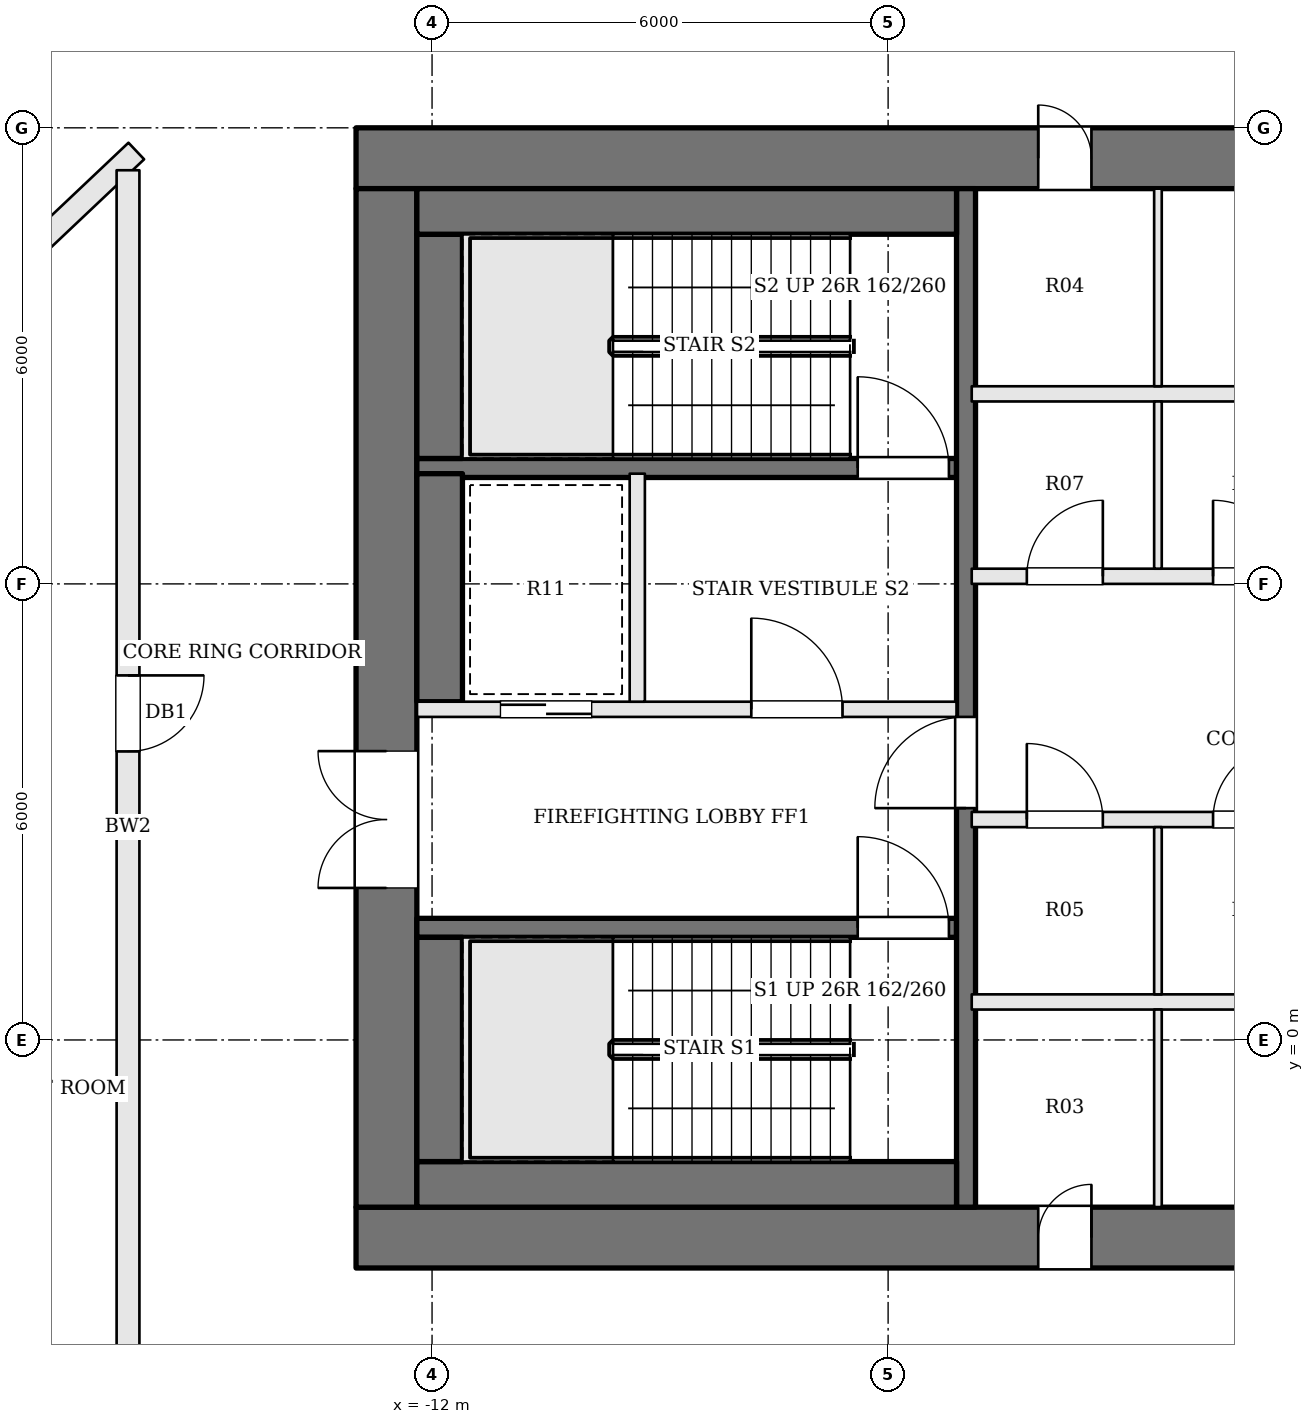
"""IFC4 building model, lengths in metres.
Left out: names, types, materials, properties, quantities, classifications, styles, units other than length and angle.
Written with IfcOpenShell. Run it as: python <this file> out.ifc"""

import sys

from ifc_helpers import new_model, si_unit, direction, frame, frame_2d, origin, place, context, subcontext, project, spatial, rectangle, extrude, element, fill, save


model = new_model("IFC4")
c1 = context("Model", 3, precision=1e-05, world=origin(), true_north=direction((0.0, 1.0)))
c2 = subcontext(c1, "Body", "Model", "MODEL_VIEW")
j1 = project(units=[si_unit("LENGTHUNIT", "METRE"), si_unit("PLANEANGLEUNIT", "RADIAN")], contexts=[c1])
p1 = place(None, origin())
s1 = spatial("IfcSite", under=j1, at=p1, CompositionType="ELEMENT")
p2 = place(p1, origin())
s2 = spatial("IfcBuilding", under=s1, at=p2, CompositionType="ELEMENT")
p3 = place(p2, frame((0.0, 0.0, 312.0)))
s3 = spatial("IfcBuildingStorey", under=s2, at=p3, CompositionType="ELEMENT", Elevation=312.0)
p4 = place(p3, frame((-13.0, 11.6, 0.0), z_axis=(0.0, 0.0, 1.0), x_axis=(1.0, 0.0, 0.0)))
e1 = element("IfcWall", 1, at=p4, inside=s3, PredefinedType="SHEAR", context=c2, shape_type="SweptSolid", body=[
    extrude(rectangle(XDim=26.0, YDim=0.8, at=frame_2d((13.0, 0.0))), origin(), (0.0, 0.0, 1.0), 4.2),
])
p5 = place(p4, frame((8.975, 0.0, 0.0)))
e2 = element("IfcOpeningElement", 2, at=p5, cuts=e1, PredefinedType="OPENING", context=c2, shape_type="SweptSolid", body=[
    extrude(rectangle(XDim=0.7, YDim=2.1, at=frame_2d((0.35, 1.05))), frame((0.0, 0.41, 0.0), z_axis=(0.0, -1.0, 0.0), x_axis=(1.0, 0.0, 0.0)), (0.0, 0.0, 1.0), 0.82),
])
p6 = place(p4, frame((11.575, 0.0, 0.0)))
e3 = element("IfcOpeningElement", 3, at=p6, cuts=e1, PredefinedType="OPENING", context=c2, shape_type="SweptSolid", body=[
    extrude(rectangle(XDim=1.2, YDim=2.1, at=frame_2d((0.6, 1.05))), frame((0.0, 0.41, 0.0), z_axis=(0.0, -1.0, 0.0), x_axis=(1.0, 0.0, 0.0)), (0.0, 0.0, 1.0), 0.82),
])
p7 = place(p4, frame((14.675, 0.0, 0.0)))
e4 = element("IfcOpeningElement", 4, at=p7, cuts=e1, PredefinedType="OPENING", context=c2, shape_type="SweptSolid", body=[
    extrude(rectangle(XDim=0.7, YDim=2.1, at=frame_2d((0.35, 1.05))), frame((0.0, 0.41, 0.0), z_axis=(0.0, -1.0, 0.0), x_axis=(1.0, 0.0, 0.0)), (0.0, 0.0, 1.0), 0.82),
])
p8 = place(p4, frame((16.725, 0.0, 0.0)))
e5 = element("IfcOpeningElement", 5, at=p8, cuts=e1, PredefinedType="OPENING", context=c2, shape_type="SweptSolid", body=[
    extrude(rectangle(XDim=0.7, YDim=2.1, at=frame_2d((0.35, 1.05))), frame((0.0, 0.41, 0.0), z_axis=(0.0, -1.0, 0.0), x_axis=(1.0, 0.0, 0.0)), (0.0, 0.0, 1.0), 0.82),
])
p9 = place(p3, frame((-13.0, -2.6, 0.0), z_axis=(0.0, 0.0, 1.0), x_axis=(1.0, 0.0, 0.0)))
e6 = element("IfcWall", 6, at=p9, inside=s3, PredefinedType="SHEAR", context=c2, shape_type="SweptSolid", body=[
    extrude(rectangle(XDim=26.0, YDim=0.8, at=frame_2d((13.0, 0.0))), origin(), (0.0, 0.0, 1.0), 4.2),
])
p10 = place(p9, frame((8.975, 0.0, 0.0)))
e7 = element("IfcOpeningElement", 7, at=p10, cuts=e6, PredefinedType="OPENING", context=c2, shape_type="SweptSolid", body=[
    extrude(rectangle(XDim=0.7, YDim=2.1, at=frame_2d((0.35, 1.05))), frame((0.0, 0.41, 0.0), z_axis=(0.0, -1.0, 0.0), x_axis=(1.0, 0.0, 0.0)), (0.0, 0.0, 1.0), 0.82),
])
p11 = place(p9, frame((12.0, 0.0, 0.0)))
e8 = element("IfcOpeningElement", 8, at=p11, cuts=e6, PredefinedType="OPENING", context=c2, shape_type="SweptSolid", body=[
    extrude(rectangle(XDim=1.2, YDim=2.1, at=frame_2d((0.6, 1.05))), frame((0.0, 0.41, 0.0), z_axis=(0.0, -1.0, 0.0), x_axis=(1.0, 0.0, 0.0)), (0.0, 0.0, 1.0), 0.82),
])
p12 = place(p9, frame((15.675, 0.0, 0.0)))
e9 = element("IfcOpeningElement", 9, at=p12, cuts=e6, PredefinedType="OPENING", context=c2, shape_type="SweptSolid", body=[
    extrude(rectangle(XDim=1.2, YDim=2.1, at=frame_2d((0.6, 1.05))), frame((0.0, 0.41, 0.0), z_axis=(0.0, -1.0, 0.0), x_axis=(1.0, 0.0, 0.0)), (0.0, 0.0, 1.0), 0.82),
])
p13 = place(p3, frame((-12.6, -2.2, 0.0), z_axis=(0.0, 0.0, 1.0), x_axis=(0.0, 1.0, 0.0)))
e10 = element("IfcWall", 10, at=p13, inside=s3, PredefinedType="SHEAR", context=c2, shape_type="SweptSolid", body=[
    extrude(rectangle(XDim=13.4, YDim=0.8, at=frame_2d((6.7, 0.0))), origin(), (0.0, 0.0, 1.0), 4.2),
])
p14 = place(p13, frame((4.2, 0.0, 0.0)))
e11 = element("IfcOpeningElement", 11, at=p14, cuts=e10, PredefinedType="OPENING", context=c2, shape_type="SweptSolid", body=[
    extrude(rectangle(XDim=1.8, YDim=2.1, at=frame_2d((0.9, 1.05))), frame((0.0, 0.41, 0.0), z_axis=(0.0, -1.0, 0.0), x_axis=(1.0, 0.0, 0.0)), (0.0, 0.0, 1.0), 0.82),
])
p15 = place(p3, frame((-12.2, 1.475, 0.0), z_axis=(0.0, 0.0, 1.0), x_axis=(1.0, 0.0, 0.0)))
e12 = element("IfcWall", 12, at=p15, inside=s3, PredefinedType="SOLIDWALL", context=c2, shape_type="SweptSolid", body=[
    extrude(rectangle(XDim=7.1, YDim=0.25, at=frame_2d((3.55, 0.0))), origin(), (0.0, 0.0, 1.0), 4.0),
])
p16 = place(p15, frame((5.8, 0.0, 0.0)))
e13 = element("IfcOpeningElement", 13, at=p16, cuts=e12, PredefinedType="OPENING", context=c2, shape_type="SweptSolid", body=[
    extrude(rectangle(XDim=1.2, YDim=2.1, at=frame_2d((0.6, 1.05))), frame((0.0, 0.135, 0.0), z_axis=(0.0, -1.0, 0.0), x_axis=(1.0, 0.0, 0.0)), (0.0, 0.0, 1.0), 0.27),
])
p17 = place(p3, frame((-12.2, 4.35, 0.0), z_axis=(0.0, 0.0, 1.0), x_axis=(1.0, 0.0, 0.0)))
e14 = element("IfcWall", 14, at=p17, inside=s3, PredefinedType="SOLIDWALL", context=c2, shape_type="SweptSolid", body=[
    extrude(rectangle(XDim=7.1, YDim=0.2, at=frame_2d((3.55, 0.0))), origin(), (0.0, 0.0, 1.0), 4.0),
])
p18 = place(p17, frame((4.4, 0.0, 0.0)))
e15 = element("IfcOpeningElement", 15, at=p18, cuts=e14, PredefinedType="OPENING", context=c2, shape_type="SweptSolid", body=[
    extrude(rectangle(XDim=1.2, YDim=2.1, at=frame_2d((0.6, 1.05))), frame((0.0, 0.11, 0.0), z_axis=(0.0, -1.0, 0.0), x_axis=(1.0, 0.0, 0.0)), (0.0, 0.0, 1.0), 0.22),
])
p19 = place(p17, frame((1.1, 0.0, 0.0)))
e16 = element("IfcOpeningElement", 16, at=p19, cuts=e14, PredefinedType="OPENING", context=c2, shape_type="SweptSolid", body=[
    extrude(rectangle(XDim=1.2, YDim=2.1, at=frame_2d((0.6, 1.05))), frame((0.0, 0.11, 0.0), z_axis=(0.0, -1.0, 0.0), x_axis=(1.0, 0.0, 0.0)), (0.0, 0.0, 1.0), 0.22),
])
p20 = place(p3, frame((-12.2, 7.525, 0.0), z_axis=(0.0, 0.0, 1.0), x_axis=(1.0, 0.0, 0.0)))
e17 = element("IfcWall", 17, at=p20, inside=s3, PredefinedType="SOLIDWALL", context=c2, shape_type="SweptSolid", body=[
    extrude(rectangle(XDim=7.1, YDim=0.25, at=frame_2d((3.55, 0.0))), origin(), (0.0, 0.0, 1.0), 4.0),
])
p21 = place(p20, frame((5.8, 0.0, 0.0)))
e18 = element("IfcOpeningElement", 18, at=p21, cuts=e17, PredefinedType="OPENING", context=c2, shape_type="SweptSolid", body=[
    extrude(rectangle(XDim=1.2, YDim=2.1, at=frame_2d((0.6, 1.05))), frame((0.0, 0.135, 0.0), z_axis=(0.0, -1.0, 0.0), x_axis=(1.0, 0.0, 0.0)), (0.0, 0.0, 1.0), 0.27),
])
p22 = place(p3, frame((-9.3, 4.45, 0.0), z_axis=(0.0, 0.0, 1.0), x_axis=(0.0, 1.0, 0.0)))
e19 = element("IfcWall", 19, at=p22, inside=s3, PredefinedType="SOLIDWALL", context=c2, shape_type="SweptSolid", body=[
    extrude(rectangle(XDim=3.0, YDim=0.2, at=frame_2d((1.5, 0.0))), origin(), (0.0, 0.0, 1.0), 4.0),
])
p23 = place(p3, frame((-4.975, -2.2, 0.0), z_axis=(0.0, 0.0, 1.0), x_axis=(0.0, 1.0, 0.0)))
e20 = element("IfcWall", 20, at=p23, inside=s3, PredefinedType="SOLIDWALL", context=c2, shape_type="SweptSolid", body=[
    extrude(rectangle(XDim=13.4, YDim=0.25, at=frame_2d((6.7, 0.0))), origin(), (0.0, 0.0, 1.0), 4.0),
])
p24 = place(p23, frame((5.25, 0.0, 0.0)))
e21 = element("IfcOpeningElement", 21, at=p24, cuts=e20, PredefinedType="OPENING", context=c2, shape_type="SweptSolid", body=[
    extrude(rectangle(XDim=1.2, YDim=2.1, at=frame_2d((0.6, 1.05))), frame((0.0, 0.135, 0.0), z_axis=(0.0, -1.0, 0.0), x_axis=(1.0, 0.0, 0.0)), (0.0, 0.0, 1.0), 0.27),
])
p25 = place(p3, frame((-12.2, -1.9, 0.0), z_axis=(0.0, 0.0, 1.0), x_axis=(1.0, 0.0, 0.0)))
e22 = element("IfcWall", 22, at=p25, inside=s3, PredefinedType="SOLIDWALL", context=c2, shape_type="SweptSolid", body=[
    extrude(rectangle(XDim=7.1, YDim=0.6, at=frame_2d((3.55, 0.0))), origin(), (0.0, 0.0, 1.0), 4.0),
])
p26 = place(p3, frame((-11.9, -1.6, 0.0), z_axis=(0.0, 0.0, 1.0), x_axis=(0.0, 1.0, 0.0)))
e23 = element("IfcWall", 23, at=p26, inside=s3, PredefinedType="SOLIDWALL", context=c2, shape_type="SweptSolid", body=[
    extrude(rectangle(XDim=2.95, YDim=0.6, at=frame_2d((1.475, 0.0))), origin(), (0.0, 0.0, 1.0), 4.0),
])
p27 = place(p3, frame((-11.9, 4.45, 0.0), z_axis=(0.0, 0.0, 1.0), x_axis=(0.0, 1.0, 0.0)))
e24 = element("IfcWall", 24, at=p27, inside=s3, PredefinedType="SOLIDWALL", context=c2, shape_type="SweptSolid", body=[
    extrude(rectangle(XDim=3.0, YDim=0.6, at=frame_2d((1.5, 0.0))), origin(), (0.0, 0.0, 1.0), 4.0),
])
p28 = place(p3, frame((-11.9, 7.65, 0.0), z_axis=(0.0, 0.0, 1.0), x_axis=(0.0, 1.0, 0.0)))
e25 = element("IfcWall", 25, at=p28, inside=s3, PredefinedType="SOLIDWALL", context=c2, shape_type="SweptSolid", body=[
    extrude(rectangle(XDim=2.95, YDim=0.6, at=frame_2d((1.475, 0.0))), origin(), (0.0, 0.0, 1.0), 4.0),
])
p29 = place(p3, frame((-12.2, 10.9, 0.0), z_axis=(0.0, 0.0, 1.0), x_axis=(1.0, 0.0, 0.0)))
e26 = element("IfcWall", 26, at=p29, inside=s3, PredefinedType="SOLIDWALL", context=c2, shape_type="SweptSolid", body=[
    extrude(rectangle(XDim=7.1, YDim=0.6, at=frame_2d((3.55, 0.0))), origin(), (0.0, 0.0, 1.0), 4.0),
])
p30 = place(p3, frame((-4.9, 0.5, 0.0), z_axis=(0.0, 0.0, 1.0), x_axis=(1.0, 0.0, 0.0)))
e27 = element("IfcWall", 27, at=p30, inside=s3, PredefinedType="SOLIDWALL", context=c2, shape_type="SweptSolid", body=[
    extrude(rectangle(XDim=9.8, YDim=0.2, at=frame_2d((4.9, 0.0))), origin(), (0.0, 0.0, 1.0), 4.0),
])
p31 = place(p3, frame((-4.9, 2.9, 0.0), z_axis=(0.0, 0.0, 1.0), x_axis=(1.0, 0.0, 0.0)))
e28 = element("IfcWall", 28, at=p31, inside=s3, PredefinedType="SOLIDWALL", context=c2, shape_type="SweptSolid", body=[
    extrude(rectangle(XDim=9.8, YDim=0.2, at=frame_2d((4.9, 0.0))), origin(), (0.0, 0.0, 1.0), 4.0),
])
p32 = place(p31, frame((0.725, 0.0, 0.0)))
e29 = element("IfcOpeningElement", 29, at=p32, cuts=e28, PredefinedType="OPENING", context=c2, shape_type="SweptSolid", body=[
    extrude(rectangle(XDim=1.0, YDim=2.1, at=frame_2d((0.5, 1.05))), frame((0.0, 0.11, 0.0), z_axis=(0.0, -1.0, 0.0), x_axis=(1.0, 0.0, 0.0)), (0.0, 0.0, 1.0), 0.22),
])
p33 = place(p31, frame((3.175, 0.0, 0.0)))
e30 = element("IfcOpeningElement", 30, at=p33, cuts=e28, PredefinedType="OPENING", context=c2, shape_type="SweptSolid", body=[
    extrude(rectangle(XDim=1.0, YDim=2.1, at=frame_2d((0.5, 1.05))), frame((0.0, 0.11, 0.0), z_axis=(0.0, -1.0, 0.0), x_axis=(1.0, 0.0, 0.0)), (0.0, 0.0, 1.0), 0.22),
])
p34 = place(p31, frame((7.463, 0.0, 0.0)))
e31 = element("IfcOpeningElement", 31, at=p34, cuts=e28, PredefinedType="OPENING", context=c2, shape_type="SweptSolid", body=[
    extrude(rectangle(XDim=1.0, YDim=2.1, at=frame_2d((0.5, 1.05))), frame((0.0, 0.11, 0.0), z_axis=(0.0, -1.0, 0.0), x_axis=(1.0, 0.0, 0.0)), (0.0, 0.0, 1.0), 0.22),
])
p35 = place(p3, frame((-4.9, 6.1, 0.0), z_axis=(0.0, 0.0, 1.0), x_axis=(1.0, 0.0, 0.0)))
e32 = element("IfcWall", 32, at=p35, inside=s3, PredefinedType="SOLIDWALL", context=c2, shape_type="SweptSolid", body=[
    extrude(rectangle(XDim=9.8, YDim=0.2, at=frame_2d((4.9, 0.0))), origin(), (0.0, 0.0, 1.0), 4.0),
])
p36 = place(p35, frame((0.725, 0.0, 0.0)))
e33 = element("IfcOpeningElement", 33, at=p36, cuts=e32, PredefinedType="OPENING", context=c2, shape_type="SweptSolid", body=[
    extrude(rectangle(XDim=1.0, YDim=2.1, at=frame_2d((0.5, 1.05))), frame((0.0, 0.11, 0.0), z_axis=(0.0, -1.0, 0.0), x_axis=(1.0, 0.0, 0.0)), (0.0, 0.0, 1.0), 0.22),
])
p37 = place(p35, frame((3.175, 0.0, 0.0)))
e34 = element("IfcOpeningElement", 34, at=p37, cuts=e32, PredefinedType="OPENING", context=c2, shape_type="SweptSolid", body=[
    extrude(rectangle(XDim=1.0, YDim=2.1, at=frame_2d((0.5, 1.05))), frame((0.0, 0.11, 0.0), z_axis=(0.0, -1.0, 0.0), x_axis=(1.0, 0.0, 0.0)), (0.0, 0.0, 1.0), 0.22),
])
p38 = place(p35, frame((5.625, 0.0, 0.0)))
e35 = element("IfcOpeningElement", 35, at=p38, cuts=e32, PredefinedType="OPENING", context=c2, shape_type="SweptSolid", body=[
    extrude(rectangle(XDim=1.0, YDim=2.1, at=frame_2d((0.5, 1.05))), frame((0.0, 0.11, 0.0), z_axis=(0.0, -1.0, 0.0), x_axis=(1.0, 0.0, 0.0)), (0.0, 0.0, 1.0), 0.22),
])
p39 = place(p35, frame((8.075, 0.0, 0.0)))
e36 = element("IfcOpeningElement", 36, at=p39, cuts=e32, PredefinedType="OPENING", context=c2, shape_type="SweptSolid", body=[
    extrude(rectangle(XDim=1.0, YDim=2.1, at=frame_2d((0.5, 1.05))), frame((0.0, 0.11, 0.0), z_axis=(0.0, -1.0, 0.0), x_axis=(1.0, 0.0, 0.0)), (0.0, 0.0, 1.0), 0.22),
])
p40 = place(p3, frame((-4.9, 8.5, 0.0), z_axis=(0.0, 0.0, 1.0), x_axis=(1.0, 0.0, 0.0)))
e37 = element("IfcWall", 37, at=p40, inside=s3, PredefinedType="SOLIDWALL", context=c2, shape_type="SweptSolid", body=[
    extrude(rectangle(XDim=9.8, YDim=0.2, at=frame_2d((4.9, 0.0))), origin(), (0.0, 0.0, 1.0), 4.0),
])
for number, where, z_axis, x_axis in (
    (38, (-2.45, 0.6, 0.0), (0.0, 0.0, 1.0), (0.0, 1.0, 0.0)),
    (39, (-2.45, 6.2, 0.0), (0.0, 0.0, 1.0), (0.0, 1.0, 0.0)),
):
    element("IfcWall", number, at=place(p3, frame(where, z_axis=z_axis, x_axis=x_axis)), inside=s3, PredefinedType="PARTITIONING", context=c2, shape_type="SweptSolid", body=[
        extrude(rectangle(XDim=2.2, YDim=0.1, at=frame_2d((1.1, 0.0))), origin(), (0.0, 0.0, 1.0), 4.0),
    ])
for number, where, z_axis, x_axis in (
    (40, (-2.45, -2.2, 0.0), (0.0, 0.0, 1.0), (0.0, 1.0, 0.0)),
    (41, (-2.45, 8.6, 0.0), (0.0, 0.0, 1.0), (0.0, 1.0, 0.0)),
):
    element("IfcWall", number, at=place(p3, frame(where, z_axis=z_axis, x_axis=x_axis)), inside=s3, PredefinedType="PARTITIONING", context=c2, shape_type="SweptSolid", body=[
        extrude(rectangle(XDim=2.6, YDim=0.1, at=frame_2d((1.3, 0.0))), origin(), (0.0, 0.0, 1.0), 4.0),
    ])
p41 = place(p3, frame((-19.671, 8.12, 0.0), z_axis=(0.0, 0.0, 1.0), x_axis=(0.726518435151, 0.687146973642, 0.0)))
e42 = element("IfcWall", 42, at=p41, inside=s3, PredefinedType="SOLIDWALL", context=c2, shape_type="SweptSolid", body=[
    extrude(rectangle(XDim=5.203, YDim=0.3, at=frame_2d((2.601, 0.0))), origin(), (0.0, 0.0, 1.0), 3.534),
])
p42 = place(p3, frame((-16.0, 11.442, 0.0), z_axis=(0.0, 0.0, 1.0), x_axis=(0.0, -1.0, 0.0)))
e43 = element("IfcWall", 43, at=p42, inside=s3, PredefinedType="SOLIDWALL", context=c2, shape_type="SweptSolid", body=[
    extrude(rectangle(XDim=17.292, YDim=0.3, at=frame_2d((8.646, 0.0))), origin(), (0.0, 0.0, 1.0), 3.534),
])
p43 = place(p42, frame((6.646, 0.0, 0.0)))
e44 = element("IfcOpeningElement", 44, at=p43, cuts=e43, PredefinedType="OPENING", context=c2, shape_type="SweptSolid", body=[
    extrude(rectangle(XDim=1.0, YDim=2.1, at=frame_2d((0.5, 1.05))), frame((0.0, 0.16, 0.0), z_axis=(0.0, -1.0, 0.0), x_axis=(1.0, 0.0, 0.0)), (0.0, 0.0, 1.0), 0.32),
])
p44 = place(p14, origin())
e45 = element("IfcDoor", 45, at=p44, inside=s3, OperationType="DOUBLE_DOOR_SINGLE_SWING", PredefinedType="DOOR", context=c2, shape_type="SweptSolid", body=[
    extrude(rectangle(XDim=1.8, YDim=2.1, at=frame_2d((0.9, 1.05))), frame((0.0, 0.025, 0.0), z_axis=(0.0, -1.0, 0.0), x_axis=(1.0, 0.0, 0.0)), (0.0, 0.0, 1.0), 0.05),
])
fill(e11, e45)
p45 = place(p24, origin())
e46 = element("IfcDoor", 46, at=p45, inside=s3, OperationType="SINGLE_SWING_LEFT", PredefinedType="DOOR", context=c2, shape_type="SweptSolid", body=[
    extrude(rectangle(XDim=1.2, YDim=2.1, at=frame_2d((0.6, 1.05))), frame((0.0, 0.025, 0.0), z_axis=(0.0, -1.0, 0.0), x_axis=(1.0, 0.0, 0.0)), (0.0, 0.0, 1.0), 0.05),
])
fill(e21, e46)
p46 = place(p18, origin())
e47 = element("IfcDoor", 47, at=p46, inside=s3, OperationType="SINGLE_SWING_LEFT", PredefinedType="DOOR", context=c2, shape_type="SweptSolid", body=[
    extrude(rectangle(XDim=1.2, YDim=2.1, at=frame_2d((0.6, 1.05))), frame((0.0, 0.025, 0.0), z_axis=(0.0, -1.0, 0.0), x_axis=(1.0, 0.0, 0.0)), (0.0, 0.0, 1.0), 0.05),
])
fill(e15, e47)
p47 = place(p16, origin())
e48 = element("IfcDoor", 48, at=p47, inside=s3, OperationType="SINGLE_SWING_LEFT", PredefinedType="DOOR", context=c2, shape_type="SweptSolid", body=[
    extrude(rectangle(XDim=1.2, YDim=2.1, at=frame_2d((0.6, 1.05))), frame((0.0, 0.025, 0.0), z_axis=(0.0, -1.0, 0.0), x_axis=(1.0, 0.0, 0.0)), (0.0, 0.0, 1.0), 0.05),
])
fill(e13, e48)
p48 = place(p21, origin())
e49 = element("IfcDoor", 49, at=p48, inside=s3, OperationType="SINGLE_SWING_LEFT", PredefinedType="DOOR", context=c2, shape_type="SweptSolid", body=[
    extrude(rectangle(XDim=1.2, YDim=2.1, at=frame_2d((0.6, 1.05))), frame((0.0, 0.025, 0.0), z_axis=(0.0, -1.0, 0.0), x_axis=(1.0, 0.0, 0.0)), (0.0, 0.0, 1.0), 0.05),
])
fill(e18, e49)
p49 = place(p19, origin())
e50 = element("IfcDoor", 50, at=p49, inside=s3, OperationType="SLIDING_TO_RIGHT", PredefinedType="DOOR", context=c2, shape_type="SweptSolid", body=[
    extrude(rectangle(XDim=1.2, YDim=2.1, at=frame_2d((0.6, 1.05))), frame((0.0, 0.025, 0.0), z_axis=(0.0, -1.0, 0.0), x_axis=(1.0, 0.0, 0.0)), (0.0, 0.0, 1.0), 0.05),
])
fill(e16, e50)
p50 = place(p32, origin())
e51 = element("IfcDoor", 51, at=p50, inside=s3, OperationType="SINGLE_SWING_LEFT", PredefinedType="DOOR", context=c2, shape_type="SweptSolid", body=[
    extrude(rectangle(XDim=1.0, YDim=2.1, at=frame_2d((0.5, 1.05))), frame((0.0, 0.025, 0.0), z_axis=(0.0, -1.0, 0.0), x_axis=(1.0, 0.0, 0.0)), (0.0, 0.0, 1.0), 0.05),
])
fill(e29, e51)
p51 = place(p33, origin())
e52 = element("IfcDoor", 52, at=p51, inside=s3, OperationType="SINGLE_SWING_RIGHT", PredefinedType="DOOR", context=c2, shape_type="SweptSolid", body=[
    extrude(rectangle(XDim=1.0, YDim=2.1, at=frame_2d((0.5, 1.05))), frame((0.0, 0.025, 0.0), z_axis=(0.0, -1.0, 0.0), x_axis=(1.0, 0.0, 0.0)), (0.0, 0.0, 1.0), 0.05),
])
fill(e30, e52)
p52 = place(p36, origin())
e53 = element("IfcDoor", 53, at=p52, inside=s3, OperationType="SINGLE_SWING_RIGHT", PredefinedType="DOOR", context=c2, shape_type="SweptSolid", body=[
    extrude(rectangle(XDim=1.0, YDim=2.1, at=frame_2d((0.5, 1.05))), frame((0.0, 0.025, 0.0), z_axis=(0.0, -1.0, 0.0), x_axis=(1.0, 0.0, 0.0)), (0.0, 0.0, 1.0), 0.05),
])
fill(e33, e53)
p53 = place(p37, origin())
e54 = element("IfcDoor", 54, at=p53, inside=s3, OperationType="SINGLE_SWING_LEFT", PredefinedType="DOOR", context=c2, shape_type="SweptSolid", body=[
    extrude(rectangle(XDim=1.0, YDim=2.1, at=frame_2d((0.5, 1.05))), frame((0.0, 0.025, 0.0), z_axis=(0.0, -1.0, 0.0), x_axis=(1.0, 0.0, 0.0)), (0.0, 0.0, 1.0), 0.05),
])
fill(e34, e54)
p54 = place(p10, origin())
e55 = element("IfcDoor", 55, at=p54, inside=s3, OperationType="SINGLE_SWING_RIGHT", PredefinedType="DOOR", context=c2, shape_type="SweptSolid", body=[
    extrude(rectangle(XDim=0.7, YDim=2.1, at=frame_2d((0.35, 1.05))), frame((0.0, 0.025, 0.0), z_axis=(0.0, -1.0, 0.0), x_axis=(1.0, 0.0, 0.0)), (0.0, 0.0, 1.0), 0.05),
])
fill(e7, e55)
p55 = place(p5, origin())
e56 = element("IfcDoor", 56, at=p55, inside=s3, OperationType="SINGLE_SWING_LEFT", PredefinedType="DOOR", context=c2, shape_type="SweptSolid", body=[
    extrude(rectangle(XDim=0.7, YDim=2.1, at=frame_2d((0.35, 1.05))), frame((0.0, 0.025, 0.0), z_axis=(0.0, -1.0, 0.0), x_axis=(1.0, 0.0, 0.0)), (0.0, 0.0, 1.0), 0.05),
])
fill(e2, e56)
p56 = place(p43, origin())
e57 = element("IfcDoor", 57, at=p56, inside=s3, OperationType="SINGLE_SWING_LEFT", PredefinedType="DOOR", context=c2, shape_type="SweptSolid", body=[
    extrude(rectangle(XDim=1.0, YDim=2.1, at=frame_2d((0.5, 1.05))), frame((0.0, 0.025, 0.0), z_axis=(0.0, -1.0, 0.0), x_axis=(1.0, 0.0, 0.0)), (0.0, 0.0, 1.0), 0.05),
])
fill(e44, e57)
save(model, sys.argv[1])
